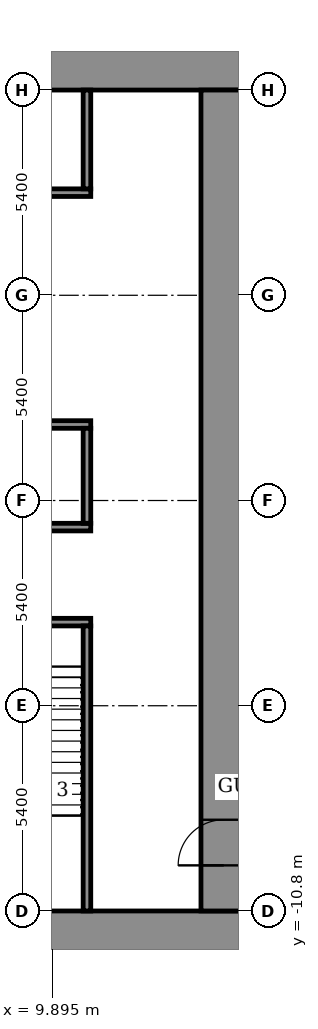
"""IFC4 building model, lengths in metres.
Left out: names, types, materials, properties, quantities, classifications, styles, units other than length and angle.
Written with IfcOpenShell. Run it as: python <this file> out.ifc"""

import sys

from ifc_helpers import new_model, si_unit, direction, frame, frame_2d, origin, place, context, subcontext, project, spatial, rectangle, extrude, element, fill, save


model = new_model("IFC4")
c1 = context("Model", 3, precision=1e-05, world=origin(), true_north=direction((0.0, 1.0)))
c2 = subcontext(c1, "Body", "Model", "MODEL_VIEW")
j1 = project(units=[si_unit("LENGTHUNIT", "METRE"), si_unit("PLANEANGLEUNIT", "RADIAN")], contexts=[c1])
p1 = place(None, origin())
s1 = spatial("IfcSite", under=j1, at=p1, CompositionType="ELEMENT")
p2 = place(p1, origin())
s2 = spatial("IfcBuilding", under=s1, at=p2, CompositionType="ELEMENT")
p3 = place(p2, frame((0.0, 0.0, 11.0)))
s3 = spatial("IfcBuildingStorey", under=s2, at=p3, CompositionType="ELEMENT", Elevation=11.0)
for number, where, z_axis, x_axis in (
    (1, (-15.0, -11.4, 0.0), (0.0, 0.0, 1.0), (1.0, 0.0, 0.0)),
    (2, (-15.0, 11.4, 0.0), (0.0, 0.0, 1.0), (1.0, 0.0, 0.0)),
):
    element("IfcWall", number, at=place(p3, frame(where, z_axis=z_axis, x_axis=x_axis)), inside=s3, PredefinedType="SHEAR", context=c2, shape_type="SweptSolid", body=[
        extrude(rectangle(XDim=30.0, YDim=1.2, at=frame_2d((15.0, 0.0))), origin(), (0.0, 0.0, 1.0), 5.0),
    ])
p4 = place(p3, frame((14.4, -10.8, 0.0), z_axis=(0.0, 0.0, 1.0), x_axis=(0.0, 1.0, 0.0)))
e3 = element("IfcWall", 3, at=p4, inside=s3, PredefinedType="SHEAR", context=c2, shape_type="SweptSolid", body=[
    extrude(rectangle(XDim=21.6, YDim=1.2, at=frame_2d((10.8, 0.0))), origin(), (0.0, 0.0, 1.0), 5.0),
])
p5 = place(p4, frame((1.2, 0.0, 0.0)))
e4 = element("IfcOpeningElement", 4, at=p5, cuts=e3, PredefinedType="OPENING", context=c2, shape_type="SweptSolid", body=[
    extrude(rectangle(XDim=1.2, YDim=2.1, at=frame_2d((0.6, 1.05))), frame((0.0, 0.61, 0.0), z_axis=(0.0, -1.0, 0.0), x_axis=(1.0, 0.0, 0.0)), (0.0, 0.0, 1.0), 1.22),
])
p6 = place(p3, frame((-10.9, -3.2, 0.0), z_axis=(0.0, 0.0, 1.0), x_axis=(1.0, 0.0, 0.0)))
e5 = element("IfcWall", 5, at=p6, inside=s3, PredefinedType="SHEAR", context=c2, shape_type="SweptSolid", body=[
    extrude(rectangle(XDim=21.8, YDim=0.2, at=frame_2d((10.9, 0.0))), origin(), (0.0, 0.0, 1.0), 4.45),
])
p7 = place(p6, frame((1.075, 0.0, 0.0)))
e6 = element("IfcOpeningElement", 6, at=p7, cuts=e5, PredefinedType="OPENING", context=c2, shape_type="SweptSolid", body=[
    extrude(rectangle(XDim=1.1, YDim=2.1, at=frame_2d((0.55, 1.05))), frame((0.0, 0.11, 0.0), z_axis=(0.0, -1.0, 0.0), x_axis=(1.0, 0.0, 0.0)), (0.0, 0.0, 1.0), 0.22),
])
p8 = place(p6, frame((10.325, 0.0, 0.0)))
e7 = element("IfcOpeningElement", 7, at=p8, cuts=e5, PredefinedType="OPENING", context=c2, shape_type="SweptSolid", body=[
    extrude(rectangle(XDim=1.1, YDim=2.1, at=frame_2d((0.55, 1.05))), frame((0.0, 0.11, 0.0), z_axis=(0.0, -1.0, 0.0), x_axis=(1.0, 0.0, 0.0)), (0.0, 0.0, 1.0), 0.22),
])
p9 = place(p6, frame((19.625, 0.0, 0.0)))
e8 = element("IfcOpeningElement", 8, at=p9, cuts=e5, PredefinedType="OPENING", context=c2, shape_type="SweptSolid", body=[
    extrude(rectangle(XDim=1.1, YDim=2.1, at=frame_2d((0.55, 1.05))), frame((0.0, 0.11, 0.0), z_axis=(0.0, -1.0, 0.0), x_axis=(1.0, 0.0, 0.0)), (0.0, 0.0, 1.0), 0.22),
])
p10 = place(p6, frame((5.7, 0.0, 0.0)))
e9 = element("IfcOpeningElement", 9, at=p10, cuts=e5, PredefinedType="OPENING", context=c2, shape_type="SweptSolid", body=[
    extrude(rectangle(XDim=1.1, YDim=2.1, at=frame_2d((0.55, 1.05))), frame((0.0, 0.11, 0.0), z_axis=(0.0, -1.0, 0.0), x_axis=(1.0, 0.0, 0.0)), (0.0, 0.0, 1.0), 0.22),
])
p11 = place(p6, frame((14.975, 0.0, 0.0)))
e10 = element("IfcOpeningElement", 10, at=p11, cuts=e5, PredefinedType="OPENING", context=c2, shape_type="SweptSolid", body=[
    extrude(rectangle(XDim=1.1, YDim=2.1, at=frame_2d((0.55, 1.05))), frame((0.0, 0.11, 0.0), z_axis=(0.0, -1.0, 0.0), x_axis=(1.0, 0.0, 0.0)), (0.0, 0.0, 1.0), 0.22),
])
p12 = place(p3, frame((-10.9, -0.7, 0.0), z_axis=(0.0, 0.0, 1.0), x_axis=(1.0, 0.0, 0.0)))
e11 = element("IfcWall", 11, at=p12, inside=s3, PredefinedType="SHEAR", context=c2, shape_type="SweptSolid", body=[
    extrude(rectangle(XDim=21.8, YDim=0.2, at=frame_2d((10.9, 0.0))), origin(), (0.0, 0.0, 1.0), 4.45),
])
p13 = place(p3, frame((-10.9, 2.0, 0.0), z_axis=(0.0, 0.0, 1.0), x_axis=(1.0, 0.0, 0.0)))
e12 = element("IfcWall", 12, at=p13, inside=s3, PredefinedType="SHEAR", context=c2, shape_type="SweptSolid", body=[
    extrude(rectangle(XDim=21.8, YDim=0.2, at=frame_2d((10.9, 0.0))), origin(), (0.0, 0.0, 1.0), 4.45),
])
p14 = place(p13, frame((0.9, 0.0, 0.0)))
e13 = element("IfcOpeningElement", 13, at=p14, cuts=e12, PredefinedType="OPENING", context=c2, shape_type="SweptSolid", body=[
    extrude(rectangle(XDim=1.1, YDim=2.1, at=frame_2d((0.55, 1.05))), frame((0.0, 0.11, 0.0), z_axis=(0.0, -1.0, 0.0), x_axis=(1.0, 0.0, 0.0)), (0.0, 0.0, 1.0), 0.22),
])
p15 = place(p13, frame((3.6, 0.0, 0.0)))
e14 = element("IfcOpeningElement", 14, at=p15, cuts=e12, PredefinedType="OPENING", context=c2, shape_type="SweptSolid", body=[
    extrude(rectangle(XDim=1.1, YDim=2.1, at=frame_2d((0.55, 1.05))), frame((0.0, 0.11, 0.0), z_axis=(0.0, -1.0, 0.0), x_axis=(1.0, 0.0, 0.0)), (0.0, 0.0, 1.0), 0.22),
])
p16 = place(p13, frame((6.3, 0.0, 0.0)))
e15 = element("IfcOpeningElement", 15, at=p16, cuts=e12, PredefinedType="OPENING", context=c2, shape_type="SweptSolid", body=[
    extrude(rectangle(XDim=1.1, YDim=2.1, at=frame_2d((0.55, 1.05))), frame((0.0, 0.11, 0.0), z_axis=(0.0, -1.0, 0.0), x_axis=(1.0, 0.0, 0.0)), (0.0, 0.0, 1.0), 0.22),
])
p17 = place(p13, frame((9.0, 0.0, 0.0)))
e16 = element("IfcOpeningElement", 16, at=p17, cuts=e12, PredefinedType="OPENING", context=c2, shape_type="SweptSolid", body=[
    extrude(rectangle(XDim=1.1, YDim=2.1, at=frame_2d((0.55, 1.05))), frame((0.0, 0.11, 0.0), z_axis=(0.0, -1.0, 0.0), x_axis=(1.0, 0.0, 0.0)), (0.0, 0.0, 1.0), 0.22),
])
p18 = place(p13, frame((11.7, 0.0, 0.0)))
e17 = element("IfcOpeningElement", 17, at=p18, cuts=e12, PredefinedType="OPENING", context=c2, shape_type="SweptSolid", body=[
    extrude(rectangle(XDim=1.1, YDim=2.1, at=frame_2d((0.55, 1.05))), frame((0.0, 0.11, 0.0), z_axis=(0.0, -1.0, 0.0), x_axis=(1.0, 0.0, 0.0)), (0.0, 0.0, 1.0), 0.22),
])
p19 = place(p13, frame((15.175, 0.0, 0.0)))
e18 = element("IfcOpeningElement", 18, at=p19, cuts=e12, PredefinedType="OPENING", context=c2, shape_type="SweptSolid", body=[
    extrude(rectangle(XDim=0.9, YDim=2.1, at=frame_2d((0.45, 1.05))), frame((0.0, 0.11, 0.0), z_axis=(0.0, -1.0, 0.0), x_axis=(1.0, 0.0, 0.0)), (0.0, 0.0, 1.0), 0.22),
])
p20 = place(p13, frame((19.225, 0.0, 0.0)))
e19 = element("IfcOpeningElement", 19, at=p20, cuts=e12, PredefinedType="OPENING", context=c2, shape_type="SweptSolid", body=[
    extrude(rectangle(XDim=0.9, YDim=2.1, at=frame_2d((0.45, 1.05))), frame((0.0, 0.11, 0.0), z_axis=(0.0, -1.0, 0.0), x_axis=(1.0, 0.0, 0.0)), (0.0, 0.0, 1.0), 0.22),
])
p21 = place(p3, frame((-10.9, 8.1, 0.0), z_axis=(0.0, 0.0, 1.0), x_axis=(1.0, 0.0, 0.0)))
e20 = element("IfcWall", 20, at=p21, inside=s3, PredefinedType="SHEAR", context=c2, shape_type="SweptSolid", body=[
    extrude(rectangle(XDim=21.8, YDim=0.2, at=frame_2d((10.9, 0.0))), origin(), (0.0, 0.0, 1.0), 4.45),
])
p22 = place(p21, frame((0.9, 0.0, 0.0)))
e21 = element("IfcOpeningElement", 21, at=p22, cuts=e20, PredefinedType="OPENING", context=c2, shape_type="SweptSolid", body=[
    extrude(rectangle(XDim=1.1, YDim=2.1, at=frame_2d((0.55, 1.05))), frame((0.0, 0.11, 0.0), z_axis=(0.0, -1.0, 0.0), x_axis=(1.0, 0.0, 0.0)), (0.0, 0.0, 1.0), 0.22),
])
p23 = place(p21, frame((3.6, 0.0, 0.0)))
e22 = element("IfcOpeningElement", 22, at=p23, cuts=e20, PredefinedType="OPENING", context=c2, shape_type="SweptSolid", body=[
    extrude(rectangle(XDim=1.1, YDim=2.1, at=frame_2d((0.55, 1.05))), frame((0.0, 0.11, 0.0), z_axis=(0.0, -1.0, 0.0), x_axis=(1.0, 0.0, 0.0)), (0.0, 0.0, 1.0), 0.22),
])
p24 = place(p21, frame((6.3, 0.0, 0.0)))
e23 = element("IfcOpeningElement", 23, at=p24, cuts=e20, PredefinedType="OPENING", context=c2, shape_type="SweptSolid", body=[
    extrude(rectangle(XDim=1.1, YDim=2.1, at=frame_2d((0.55, 1.05))), frame((0.0, 0.11, 0.0), z_axis=(0.0, -1.0, 0.0), x_axis=(1.0, 0.0, 0.0)), (0.0, 0.0, 1.0), 0.22),
])
p25 = place(p21, frame((9.0, 0.0, 0.0)))
e24 = element("IfcOpeningElement", 24, at=p25, cuts=e20, PredefinedType="OPENING", context=c2, shape_type="SweptSolid", body=[
    extrude(rectangle(XDim=1.1, YDim=2.1, at=frame_2d((0.55, 1.05))), frame((0.0, 0.11, 0.0), z_axis=(0.0, -1.0, 0.0), x_axis=(1.0, 0.0, 0.0)), (0.0, 0.0, 1.0), 0.22),
])
p26 = place(p21, frame((11.7, 0.0, 0.0)))
e25 = element("IfcOpeningElement", 25, at=p26, cuts=e20, PredefinedType="OPENING", context=c2, shape_type="SweptSolid", body=[
    extrude(rectangle(XDim=1.1, YDim=2.1, at=frame_2d((0.55, 1.05))), frame((0.0, 0.11, 0.0), z_axis=(0.0, -1.0, 0.0), x_axis=(1.0, 0.0, 0.0)), (0.0, 0.0, 1.0), 0.22),
])
p27 = place(p21, frame((15.175, 0.0, 0.0)))
e26 = element("IfcOpeningElement", 26, at=p27, cuts=e20, PredefinedType="OPENING", context=c2, shape_type="SweptSolid", body=[
    extrude(rectangle(XDim=0.9, YDim=2.1, at=frame_2d((0.45, 1.05))), frame((0.0, 0.11, 0.0), z_axis=(0.0, -1.0, 0.0), x_axis=(1.0, 0.0, 0.0)), (0.0, 0.0, 1.0), 0.22),
])
p28 = place(p21, frame((19.225, 0.0, 0.0)))
e27 = element("IfcOpeningElement", 27, at=p28, cuts=e20, PredefinedType="OPENING", context=c2, shape_type="SweptSolid", body=[
    extrude(rectangle(XDim=0.9, YDim=2.1, at=frame_2d((0.45, 1.05))), frame((0.0, 0.11, 0.0), z_axis=(0.0, -1.0, 0.0), x_axis=(1.0, 0.0, 0.0)), (0.0, 0.0, 1.0), 0.22),
])
p29 = place(p3, frame((10.8, -10.8, 0.0), z_axis=(0.0, 0.0, 1.0), x_axis=(0.0, 1.0, 0.0)))
e28 = element("IfcWall", 28, at=p29, inside=s3, PredefinedType="SHEAR", context=c2, shape_type="SweptSolid", body=[
    extrude(rectangle(XDim=7.5, YDim=0.2, at=frame_2d((3.75, 0.0))), origin(), (0.0, 0.0, 1.0), 4.45),
])
p30 = place(p3, frame((10.8, -0.6, 0.0), z_axis=(0.0, 0.0, 1.0), x_axis=(0.0, 1.0, 0.0)))
e29 = element("IfcWall", 29, at=p30, inside=s3, PredefinedType="STANDARD", context=c2, shape_type="SweptSolid", body=[
    extrude(rectangle(XDim=2.5, YDim=0.2, at=frame_2d((1.25, 0.0))), origin(), (0.0, 0.0, 1.0), 4.45),
])
p31 = place(p3, frame((10.8, 8.2, 0.0), z_axis=(0.0, 0.0, 1.0), x_axis=(0.0, 1.0, 0.0)))
e30 = element("IfcWall", 30, at=p31, inside=s3, PredefinedType="STANDARD", context=c2, shape_type="SweptSolid", body=[
    extrude(rectangle(XDim=2.6, YDim=0.2, at=frame_2d((1.3, 0.0))), origin(), (0.0, 0.0, 1.0), 4.45),
])
p32 = place(p5, origin())
e31 = element("IfcDoor", 31, at=p32, inside=s3, OperationType="DOUBLE_DOOR_SINGLE_SWING", PredefinedType="DOOR", context=c2, shape_type="SweptSolid", body=[
    extrude(rectangle(XDim=1.2, YDim=2.1, at=frame_2d((0.6, 1.05))), frame((0.0, 0.025, 0.0), z_axis=(0.0, -1.0, 0.0), x_axis=(1.0, 0.0, 0.0)), (0.0, 0.0, 1.0), 0.05),
])
fill(e4, e31)
save(model, sys.argv[1])
